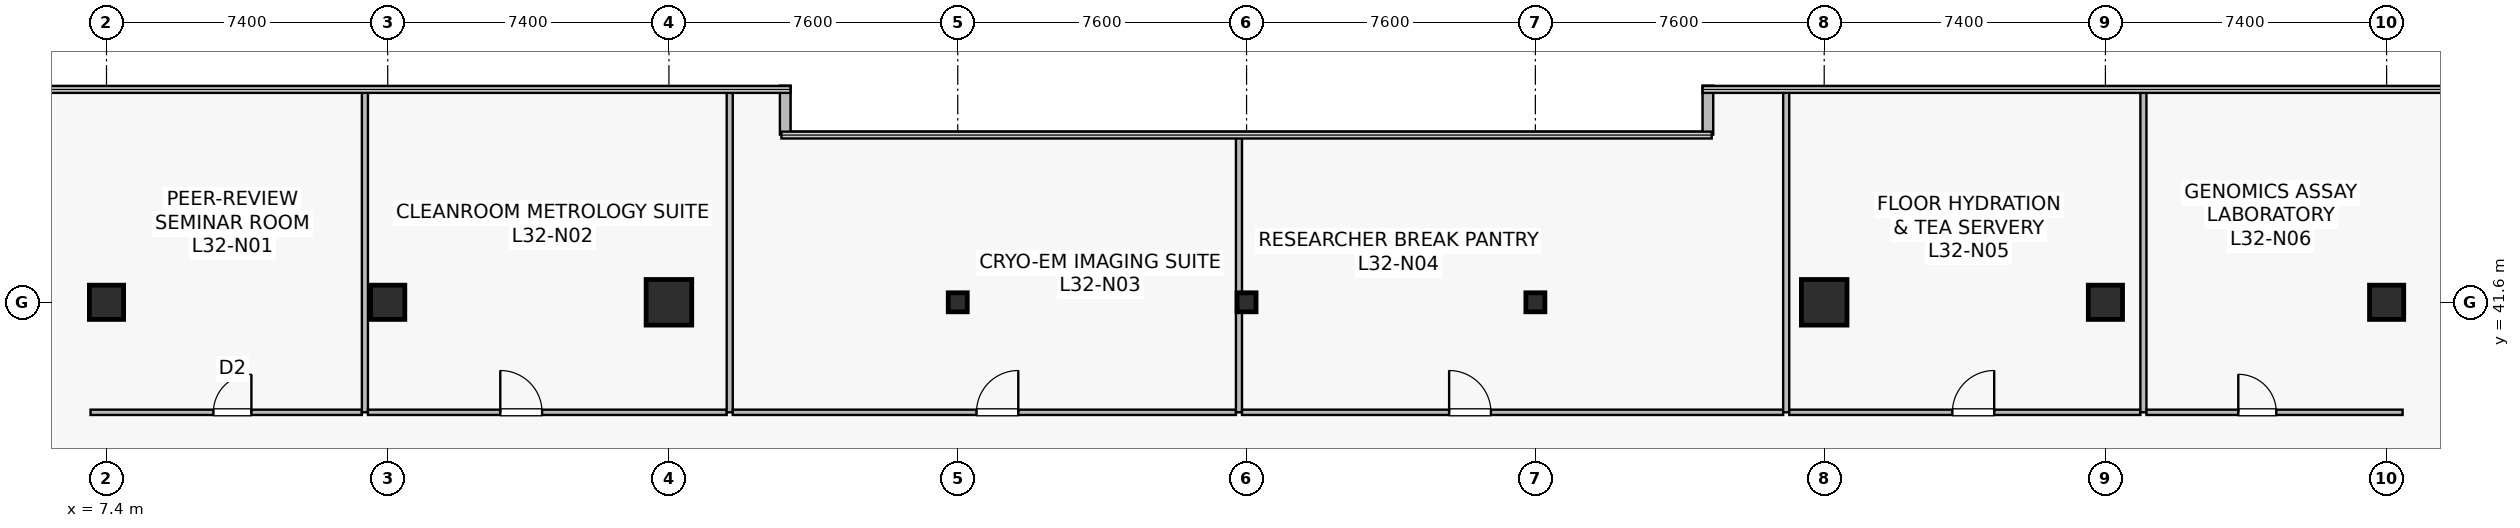
"""IFC4 building model, lengths in metres.
Left out: names, types, materials, properties, quantities, classifications, styles, units other than length and angle.
Written with IfcOpenShell. Run it as: python <this file> out.ifc"""

import sys

from ifc_helpers import new_model, si_unit, direction, frame, frame_2d, origin, origin_2d, place, context, subcontext, project, spatial, rectangle, hollow_rectangle, extrude, source, transform, mapped, element, fill, save


model = new_model("IFC4")
c1 = context("Model", 3, precision=1e-05, world=origin(), true_north=direction((0.0, 1.0)))
c2 = subcontext(c1, "Body", "Model", "MODEL_VIEW")
j1 = project(units=[si_unit("LENGTHUNIT", "METRE"), si_unit("PLANEANGLEUNIT", "RADIAN")], contexts=[c1])
p1 = place(None, origin())
s1 = spatial("IfcSite", under=j1, at=p1, CompositionType="ELEMENT")
p2 = place(p1, origin())
s2 = spatial("IfcBuilding", under=s1, at=p2, CompositionType="ELEMENT")
p3 = place(p2, frame((0.0, 0.0, 133.8)))
s3 = spatial("IfcBuildingStorey", under=s2, at=p3, CompositionType="ELEMENT", Elevation=133.8)
m1 = source(origin(), c2, "Body", "SweptSolid", [
    extrude(rectangle(XDim=0.9, YDim=0.9, at=origin_2d()), origin(), (0.0, 0.0, 1.0), 4.1),
])
p4 = place(p3, frame((14.8, 41.6, 0.0), z_axis=(0.0, 0.0, 1.0), x_axis=(1.0, 0.0, 0.0)))
e1 = element("IfcColumn", 1, at=p4, inside=s3, PredefinedType="COLUMN", context=c2, shape_type="MappedRepresentation", body=[
    mapped(m1, transform((0.0, 0.0, 0.0), scale=1.0)),
])
m2 = source(origin(), c2, "Body", "SweptSolid", [
    extrude(rectangle(XDim=1.2, YDim=1.2, at=origin_2d()), origin(), (0.0, 0.0, 1.0), 4.1),
])
for number, where, z_axis, x_axis in (
    (2, (22.2, 41.6, 0.0), (0.0, 0.0, 1.0), (1.0, 0.0, 0.0)),
    (3, (52.6, 41.6, 0.0), (0.0, 0.0, 1.0), (1.0, 0.0, 0.0)),
):
    element("IfcColumn", number, at=place(p3, frame(where, z_axis=z_axis, x_axis=x_axis)), inside=s3, PredefinedType="COLUMN", context=c2, shape_type="MappedRepresentation", body=[
        mapped(m2, transform((0.0, 0.0, 0.0), scale=1.0)),
    ])
for number, where, z_axis, x_axis in (
    (4, (60.0, 41.6, 0.0), (0.0, 0.0, 1.0), (1.0, 0.0, 0.0)),
    (5, (7.4, 41.6, 0.0), (0.0, 0.0, 1.0), (1.0, 0.0, 0.0)),
    (6, (67.4, 41.6, 0.0), (0.0, 0.0, 1.0), (1.0, 0.0, 0.0)),
):
    element("IfcColumn", number, at=place(p3, frame(where, z_axis=z_axis, x_axis=x_axis)), inside=s3, PredefinedType="COLUMN", context=c2, shape_type="MappedRepresentation", body=[
        mapped(m1, transform((0.0, 0.0, 0.0), scale=1.0)),
    ])
m3 = source(origin(), c2, "Body", "SweptSolid", [
    extrude(hollow_rectangle(XDim=0.5, YDim=0.5, WallThickness=0.022, at=origin_2d()), origin(), (0.0, 0.0, 1.0), 4.1),
])
for number, where, z_axis, x_axis in (
    (7, (29.8, 41.6, 0.0), (0.0, 0.0, 1.0), (1.0, 0.0, 0.0)),
    (8, (37.4, 41.6, 0.0), (0.0, 0.0, 1.0), (1.0, 0.0, 0.0)),
    (9, (45.0, 41.6, 0.0), (0.0, 0.0, 1.0), (1.0, 0.0, 0.0)),
):
    element("IfcColumn", number, at=place(p3, frame(where, z_axis=z_axis, x_axis=x_axis)), inside=s3, PredefinedType="COLUMN", context=c2, shape_type="MappedRepresentation", body=[
        mapped(m3, transform((0.0, 0.0, 0.0), scale=1.0)),
    ])
for number, where, z_axis, x_axis in (
    (10, (49.54, 47.3, 0.0), (0.0, 0.0, 1.0), (0.0, -1.0, 0.0)),
    (11, (25.26, 46.012, 0.0), (0.0, 0.0, 1.0), (0.0, 1.0, 0.0)),
):
    element("IfcWall", number, at=place(p3, frame(where, z_axis=z_axis, x_axis=x_axis)), inside=s3, PredefinedType="STANDARD", context=c2, shape_type="SweptSolid", body=[
        extrude(rectangle(XDim=1.288, YDim=0.28, at=frame_2d((0.644, 0.0))), origin(), (0.0, 0.0, 1.0), 3.79),
    ])
p5 = place(p3, frame((6.98, 38.705, 0.0), z_axis=(0.0, 0.0, 1.0), x_axis=(1.0, 0.0, 0.0)))
e12 = element("IfcWall", 12, at=p5, inside=s3, PredefinedType="PARTITIONING", context=c2, shape_type="SweptSolid", body=[
    extrude(rectangle(XDim=7.14, YDim=0.14, at=frame_2d((3.57, 0.0))), origin(), (0.0, 0.0, 1.0), 3.275),
])
p6 = place(p5, frame((3.233, 0.0, 0.0)))
e13 = element("IfcOpeningElement", 13, at=p6, cuts=e12, PredefinedType="OPENING", context=c2, shape_type="SweptSolid", body=[
    extrude(rectangle(XDim=1.0, YDim=2.15, at=frame_2d((0.5, 1.075))), frame((0.0, 0.08, 0.0), z_axis=(0.0, -1.0, 0.0), x_axis=(1.0, 0.0, 0.0)), (0.0, 0.0, 1.0), 0.16),
])
p7 = place(p3, frame((14.2, 38.705, 0.0), z_axis=(0.0, 0.0, 1.0), x_axis=(0.0, 1.0, 0.0)))
e14 = element("IfcWall", 14, at=p7, inside=s3, PredefinedType="PARTITIONING", context=c2, shape_type="SweptSolid", body=[
    extrude(rectangle(XDim=8.485, YDim=0.16, at=frame_2d((4.242, 0.0))), origin(), (0.0, 0.0, 1.0), 3.075),
])
p8 = place(p3, frame((14.28, 38.705, 0.0), z_axis=(0.0, 0.0, 1.0), x_axis=(1.0, 0.0, 0.0)))
e15 = element("IfcWall", 15, at=p8, inside=s3, PredefinedType="PARTITIONING", context=c2, shape_type="SweptSolid", body=[
    extrude(rectangle(XDim=9.44, YDim=0.14, at=frame_2d((4.72, 0.0))), origin(), (0.0, 0.0, 1.0), 3.125),
])
p9 = place(p8, frame((3.482, 0.0, 0.0)))
e16 = element("IfcOpeningElement", 16, at=p9, cuts=e15, PredefinedType="OPENING", context=c2, shape_type="SweptSolid", body=[
    extrude(rectangle(XDim=1.1, YDim=2.18, at=frame_2d((0.55, 1.09))), frame((0.0, 0.08, 0.0), z_axis=(0.0, -1.0, 0.0), x_axis=(1.0, 0.0, 0.0)), (0.0, 0.0, 1.0), 0.16),
])
p10 = place(p3, frame((23.8, 38.705, 0.0), z_axis=(0.0, 0.0, 1.0), x_axis=(0.0, 1.0, 0.0)))
e17 = element("IfcWall", 17, at=p10, inside=s3, PredefinedType="PARTITIONING", context=c2, shape_type="SweptSolid", body=[
    extrude(rectangle(XDim=8.485, YDim=0.16, at=frame_2d((4.242, 0.0))), origin(), (0.0, 0.0, 1.0), 3.075),
])
p11 = place(p3, frame((23.88, 38.705, 0.0), z_axis=(0.0, 0.0, 1.0), x_axis=(1.0, 0.0, 0.0)))
e18 = element("IfcWall", 18, at=p11, inside=s3, PredefinedType="PARTITIONING", context=c2, shape_type="SweptSolid", body=[
    extrude(rectangle(XDim=13.24, YDim=0.14, at=frame_2d((6.62, 0.0))), origin(), (0.0, 0.0, 1.0), 3.125),
])
p12 = place(p11, frame((6.413, 0.0, 0.0)))
e19 = element("IfcOpeningElement", 19, at=p12, cuts=e18, PredefinedType="OPENING", context=c2, shape_type="SweptSolid", body=[
    extrude(rectangle(XDim=1.1, YDim=2.18, at=frame_2d((0.55, 1.09))), frame((0.0, 0.08, 0.0), z_axis=(0.0, -1.0, 0.0), x_axis=(1.0, 0.0, 0.0)), (0.0, 0.0, 1.0), 0.16),
])
p13 = place(p3, frame((37.2, 38.705, 0.0), z_axis=(0.0, 0.0, 1.0), x_axis=(0.0, 1.0, 0.0)))
e20 = element("IfcWall", 20, at=p13, inside=s3, PredefinedType="PARTITIONING", context=c2, shape_type="SweptSolid", body=[
    extrude(rectangle(XDim=7.285, YDim=0.16, at=frame_2d((3.643, 0.0))), origin(), (0.0, 0.0, 1.0), 3.075),
])
p14 = place(p3, frame((37.28, 38.705, 0.0), z_axis=(0.0, 0.0, 1.0), x_axis=(1.0, 0.0, 0.0)))
e21 = element("IfcWall", 21, at=p14, inside=s3, PredefinedType="PARTITIONING", context=c2, shape_type="SweptSolid", body=[
    extrude(rectangle(XDim=14.24, YDim=0.14, at=frame_2d((7.12, 0.0))), origin(), (0.0, 0.0, 1.0), 3.125),
])
p15 = place(p14, frame((5.45, 0.0, 0.0)))
e22 = element("IfcOpeningElement", 22, at=p15, cuts=e21, PredefinedType="OPENING", context=c2, shape_type="SweptSolid", body=[
    extrude(rectangle(XDim=1.1, YDim=2.18, at=frame_2d((0.55, 1.09))), frame((0.0, 0.08, 0.0), z_axis=(0.0, -1.0, 0.0), x_axis=(1.0, 0.0, 0.0)), (0.0, 0.0, 1.0), 0.16),
])
p16 = place(p3, frame((51.6, 38.705, 0.0), z_axis=(0.0, 0.0, 1.0), x_axis=(0.0, 1.0, 0.0)))
e23 = element("IfcWall", 23, at=p16, inside=s3, PredefinedType="PARTITIONING", context=c2, shape_type="SweptSolid", body=[
    extrude(rectangle(XDim=8.485, YDim=0.16, at=frame_2d((4.242, 0.0))), origin(), (0.0, 0.0, 1.0), 3.075),
])
p17 = place(p3, frame((51.68, 38.705, 0.0), z_axis=(0.0, 0.0, 1.0), x_axis=(1.0, 0.0, 0.0)))
e24 = element("IfcWall", 24, at=p17, inside=s3, PredefinedType="PARTITIONING", context=c2, shape_type="SweptSolid", body=[
    extrude(rectangle(XDim=9.24, YDim=0.14, at=frame_2d((4.62, 0.0))), origin(), (0.0, 0.0, 1.0), 3.125),
])
p18 = place(p17, frame((4.293, 0.0, 0.0)))
e25 = element("IfcOpeningElement", 25, at=p18, cuts=e24, PredefinedType="OPENING", context=c2, shape_type="SweptSolid", body=[
    extrude(rectangle(XDim=1.1, YDim=2.18, at=frame_2d((0.55, 1.09))), frame((0.0, 0.08, 0.0), z_axis=(0.0, -1.0, 0.0), x_axis=(1.0, 0.0, 0.0)), (0.0, 0.0, 1.0), 0.16),
])
p19 = place(p3, frame((61.0, 38.705, 0.0), z_axis=(0.0, 0.0, 1.0), x_axis=(0.0, 1.0, 0.0)))
e26 = element("IfcWall", 26, at=p19, inside=s3, PredefinedType="PARTITIONING", context=c2, shape_type="SweptSolid", body=[
    extrude(rectangle(XDim=8.485, YDim=0.16, at=frame_2d((4.242, 0.0))), origin(), (0.0, 0.0, 1.0), 3.075),
])
p20 = place(p3, frame((61.08, 38.705, 0.0), z_axis=(0.0, 0.0, 1.0), x_axis=(1.0, 0.0, 0.0)))
e27 = element("IfcWall", 27, at=p20, inside=s3, PredefinedType="PARTITIONING", context=c2, shape_type="SweptSolid", body=[
    extrude(rectangle(XDim=6.74, YDim=0.14, at=frame_2d((3.37, 0.0))), origin(), (0.0, 0.0, 1.0), 3.275),
])
p21 = place(p20, frame((2.417, 0.0, 0.0)))
e28 = element("IfcOpeningElement", 28, at=p21, cuts=e27, PredefinedType="OPENING", context=c2, shape_type="SweptSolid", body=[
    extrude(rectangle(XDim=1.0, YDim=2.15, at=frame_2d((0.5, 1.075))), frame((0.0, 0.08, 0.0), z_axis=(0.0, -1.0, 0.0), x_axis=(1.0, 0.0, 0.0)), (0.0, 0.0, 1.0), 0.16),
])
m4 = source(origin(), c2, "Body", "SweptSolid", [
    extrude(rectangle(XDim=1.0, YDim=2.15, at=frame_2d((0.5, 1.075))), frame((0.0, 0.025, 0.0), z_axis=(0.0, -1.0, 0.0), x_axis=(1.0, 0.0, 0.0)), (0.0, 0.0, 1.0), 0.05),
])
p22 = place(p6, origin())
e29 = element("IfcDoor", 29, at=p22, inside=s3, OperationType="SINGLE_SWING_RIGHT", PredefinedType="DOOR", context=c2, shape_type="MappedRepresentation", body=[
    mapped(m4, transform((0.0, 0.0, 0.0), scale=1.0)),
])
fill(e13, e29)
m5 = source(origin(), c2, "Body", "SweptSolid", [
    extrude(rectangle(XDim=1.1, YDim=2.18, at=frame_2d((0.55, 1.09))), frame((0.0, 0.025, 0.0), z_axis=(0.0, -1.0, 0.0), x_axis=(1.0, 0.0, 0.0)), (0.0, 0.0, 1.0), 0.05),
])
p23 = place(p9, origin())
e30 = element("IfcDoor", 30, at=p23, inside=s3, OperationType="SINGLE_SWING_LEFT", PredefinedType="DOOR", context=c2, shape_type="MappedRepresentation", body=[
    mapped(m5, transform((0.0, 0.0, 0.0), scale=1.0)),
])
fill(e16, e30)
p24 = place(p12, origin())
e31 = element("IfcDoor", 31, at=p24, inside=s3, OperationType="SINGLE_SWING_RIGHT", PredefinedType="DOOR", context=c2, shape_type="MappedRepresentation", body=[
    mapped(m5, transform((0.0, 0.0, 0.0), scale=1.0)),
])
fill(e19, e31)
p25 = place(p15, origin())
e32 = element("IfcDoor", 32, at=p25, inside=s3, OperationType="SINGLE_SWING_LEFT", PredefinedType="DOOR", context=c2, shape_type="MappedRepresentation", body=[
    mapped(m5, transform((0.0, 0.0, 0.0), scale=1.0)),
])
fill(e22, e32)
p26 = place(p18, origin())
e33 = element("IfcDoor", 33, at=p26, inside=s3, OperationType="SINGLE_SWING_RIGHT", PredefinedType="DOOR", context=c2, shape_type="MappedRepresentation", body=[
    mapped(m5, transform((0.0, 0.0, 0.0), scale=1.0)),
])
fill(e25, e33)
p27 = place(p21, origin())
e34 = element("IfcDoor", 34, at=p27, inside=s3, OperationType="SINGLE_SWING_LEFT", PredefinedType="DOOR", context=c2, shape_type="MappedRepresentation", body=[
    mapped(m4, transform((0.0, 0.0, 0.0), scale=1.0)),
])
fill(e28, e34)
save(model, sys.argv[1])
